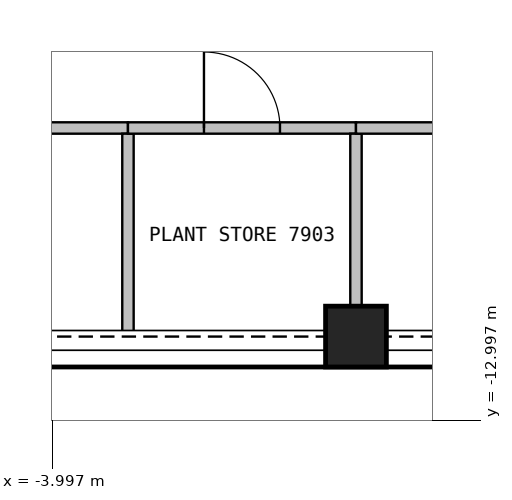
"""IFC4 building model, lengths in metres.
Left out: names, types, materials, properties, quantities, classifications, styles, units other than length and angle.
Written with IfcOpenShell. Run it as: python <this file> out.ifc"""

import sys

from ifc_helpers import new_model, si_unit, direction, frame, frame_2d, origin, origin_2d, place, context, subcontext, project, spatial, rectangle, extrude, element, fill, save


model = new_model("IFC4")
c1 = context("Model", 3, precision=1e-05, world=origin(), true_north=direction((0.0, 1.0)))
c2 = subcontext(c1, "Body", "Model", "MODEL_VIEW")
j1 = project(units=[si_unit("LENGTHUNIT", "METRE"), si_unit("PLANEANGLEUNIT", "RADIAN")], contexts=[c1])
p1 = place(None, origin())
s1 = spatial("IfcSite", under=j1, at=p1, CompositionType="ELEMENT")
p2 = place(p1, origin())
s2 = spatial("IfcBuilding", under=s1, at=p2, CompositionType="ELEMENT")
p3 = place(p2, frame((0.0, 0.0, 323.4)))
s3 = spatial("IfcBuildingStorey", under=s2, at=p3, CompositionType="ELEMENT", Elevation=323.4)
p4 = place(p3, frame((0.0, -11.894, 0.0), z_axis=(0.0, 0.0, 1.0), x_axis=(1.0, 0.0, 0.0)))
e1 = element("IfcColumn", 1, at=p4, inside=s3, PredefinedType="COLUMN", context=c2, shape_type="SweptSolid", body=[
    extrude(rectangle(XDim=0.8, YDim=0.8, at=origin_2d()), origin(), (0.0, 0.0, 1.0), 4.05),
])
p5 = place(p3, frame((-12.003, -9.15, 0.0), z_axis=(0.0, 0.0, 1.0), x_axis=(1.0, 0.0, 0.0)))
e2 = element("IfcWall", 2, at=p5, inside=s3, PredefinedType="PARTITIONING", context=c2, shape_type="SweptSolid", body=[
    extrude(rectangle(XDim=9.003, YDim=0.15, at=frame_2d((4.501, 0.0))), origin(), (0.0, 0.0, 1.0), 4.05),
])
p6 = place(p5, frame((4.001, 0.0, 0.0)))
e3 = element("IfcOpeningElement", 3, at=p6, cuts=e2, PredefinedType="OPENING", context=c2, shape_type="SweptSolid", body=[
    extrude(rectangle(XDim=1.0, YDim=2.1, at=frame_2d((0.5, 1.05))), frame((0.0, 0.085, 0.0), z_axis=(0.0, -1.0, 0.0), x_axis=(1.0, 0.0, 0.0)), (0.0, 0.0, 1.0), 0.17),
])
p7 = place(p3, frame((-3.0, -9.225, 0.0), z_axis=(0.0, 0.0, 1.0), x_axis=(0.0, -1.0, 0.0)))
e4 = element("IfcWall", 4, at=p7, inside=s3, PredefinedType="PARTITIONING", context=c2, shape_type="SweptSolid", body=[
    extrude(rectangle(XDim=2.769, YDim=0.15, at=frame_2d((1.384, 0.0))), origin(), (0.0, 0.0, 1.0), 4.05),
])
p8 = place(p3, frame((-3.0, -9.15, 0.0), z_axis=(0.0, 0.0, 1.0), x_axis=(1.0, 0.0, 0.0)))
e5 = element("IfcWall", 5, at=p8, inside=s3, PredefinedType="PARTITIONING", context=c2, shape_type="SweptSolid", body=[
    extrude(rectangle(XDim=3.0, YDim=0.15, at=frame_2d((1.5, 0.0))), origin(), (0.0, 0.0, 1.0), 4.05),
])
p9 = place(p8, frame((1.0, 0.0, 0.0)))
e6 = element("IfcOpeningElement", 6, at=p9, cuts=e5, PredefinedType="OPENING", context=c2, shape_type="SweptSolid", body=[
    extrude(rectangle(XDim=1.0, YDim=2.1, at=frame_2d((0.5, 1.05))), frame((0.0, 0.085, 0.0), z_axis=(0.0, -1.0, 0.0), x_axis=(1.0, 0.0, 0.0)), (0.0, 0.0, 1.0), 0.17),
])
p10 = place(p3, frame((0.0, -9.225, 0.0), z_axis=(0.0, 0.0, 1.0), x_axis=(0.0, -1.0, 0.0)))
e7 = element("IfcWall", 7, at=p10, inside=s3, PredefinedType="PARTITIONING", context=c2, shape_type="SweptSolid", body=[
    extrude(rectangle(XDim=2.769, YDim=0.15, at=frame_2d((1.384, 0.0))), origin(), (0.0, 0.0, 1.0), 4.05),
])
p11 = place(p3, frame((0.0, -9.15, 0.0), z_axis=(0.0, 0.0, 1.0), x_axis=(1.0, 0.0, 0.0)))
e8 = element("IfcWall", 8, at=p11, inside=s3, PredefinedType="PARTITIONING", context=c2, shape_type="SweptSolid", body=[
    extrude(rectangle(XDim=12.003, YDim=0.15, at=frame_2d((6.001, 0.0))), origin(), (0.0, 0.0, 1.0), 4.05),
])
p12 = place(p11, frame((5.501, 0.0, 0.0)))
e9 = element("IfcOpeningElement", 9, at=p12, cuts=e8, PredefinedType="OPENING", context=c2, shape_type="SweptSolid", body=[
    extrude(rectangle(XDim=1.0, YDim=2.1, at=frame_2d((0.5, 1.05))), frame((0.0, 0.085, 0.0), z_axis=(0.0, -1.0, 0.0), x_axis=(1.0, 0.0, 0.0)), (0.0, 0.0, 1.0), 0.17),
])
p13 = place(p9, origin())
e10 = element("IfcDoor", 10, at=p13, inside=s3, OperationType="SINGLE_SWING_RIGHT", PredefinedType="DOOR", context=c2, shape_type="SweptSolid", body=[
    extrude(rectangle(XDim=1.0, YDim=2.1, at=frame_2d((0.5, 1.05))), frame((0.0, 0.025, 0.0), z_axis=(0.0, -1.0, 0.0), x_axis=(1.0, 0.0, 0.0)), (0.0, 0.0, 1.0), 0.05),
])
fill(e6, e10)
save(model, sys.argv[1])
